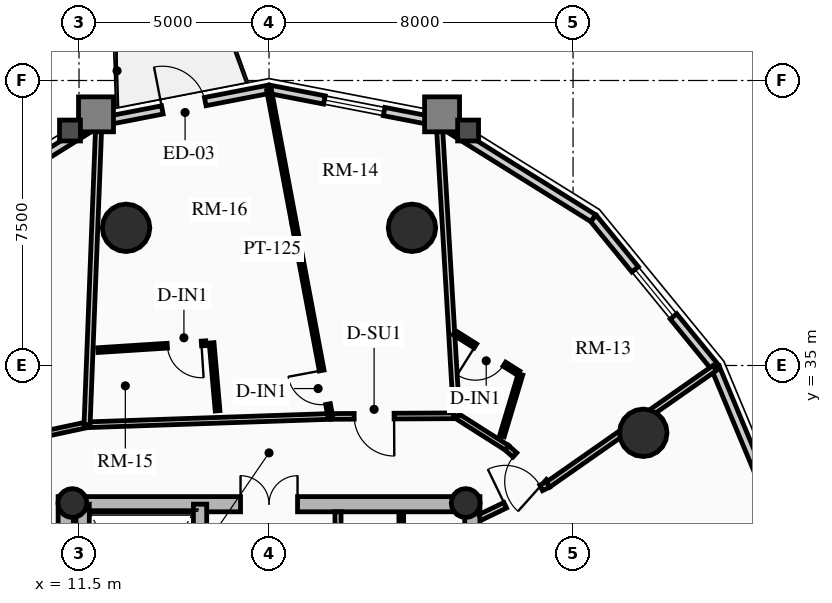
"""IFC4 building model, lengths in metres.
Left out: names, types, materials, properties, quantities, classifications, styles, units other than length and angle.
Written with IfcOpenShell. Run it as: python <this file> out.ifc"""

import sys

from ifc_helpers import new_model, si_unit, direction, frame, frame_2d, origin, origin_2d, place, context, subcontext, project, spatial, rectangle, circle, hollow_circle, extrude, source, transform, mapped, element, fill, save


model = new_model("IFC4")
c1 = context("Model", 3, precision=1e-05, world=origin(), true_north=direction((0.0, 1.0)))
c2 = subcontext(c1, "Body", "Model", "MODEL_VIEW")
j1 = project(units=[si_unit("LENGTHUNIT", "METRE"), si_unit("PLANEANGLEUNIT", "RADIAN")], contexts=[c1])
p1 = place(None, origin())
s1 = spatial("IfcSite", under=j1, at=p1, CompositionType="ELEMENT")
p2 = place(p1, origin())
s2 = spatial("IfcBuilding", under=s1, at=p2, CompositionType="ELEMENT")
p3 = place(p2, frame((0.0, 0.0, 151.6)))
s3 = spatial("IfcBuildingStorey", under=s2, at=p3, CompositionType="ELEMENT", Elevation=151.6)
for number, where, z_axis, x_axis in (
    (1, (11.15, 17.45, 0.0), (0.0, 0.0, 1.0), (0.0, 1.0, 0.0)),
    (2, (21.85, 17.45, 0.0), (0.0, 0.0, 1.0), (0.0, 1.0, 0.0)),
):
    element("IfcWall", number, at=place(p3, frame(where, z_axis=z_axis, x_axis=x_axis)), inside=s3, PredefinedType="SHEAR", context=c2, shape_type="SweptSolid", body=[
        extrude(rectangle(XDim=14.1, YDim=0.4, at=frame_2d((7.05, 0.0))), origin(), (0.0, 0.0, 1.0), 2.91),
    ])
p4 = place(p3, frame((11.15, 31.35, 0.0), z_axis=(0.0, 0.0, 1.0), x_axis=(1.0, 0.0, 0.0)))
e3 = element("IfcWall", 3, at=p4, inside=s3, PredefinedType="SHEAR", context=c2, shape_type="SweptSolid", body=[
    extrude(rectangle(XDim=10.7, YDim=0.4, at=frame_2d((5.35, 0.0))), origin(), (0.0, 0.0, 1.0), 2.91),
])
m1 = source(origin(), c2, "Body", "SweptSolid", [
    extrude(rectangle(XDim=1.5, YDim=2.02, at=frame_2d((0.75, 1.01))), frame((0.0, 0.21, 0.0), z_axis=(0.0, -1.0, 0.0), x_axis=(1.0, 0.0, 0.0)), (0.0, 0.0, 1.0), 0.42),
])
p5 = place(p4, frame((4.6, 0.0, 0.0)))
e4 = element("IfcOpeningElement", 4, at=p5, cuts=e3, PredefinedType="OPENING", context=c2, shape_type="MappedRepresentation", body=[
    mapped(m1, transform((0.0, 0.0, 0.0), x_axis=(1.0, 0.0, 0.0), y_axis=(0.0, 1.0, 0.0), z_axis=(0.0, 0.0, 1.0), scale=1.0)),
])
p6 = place(p3, frame((14.685, 17.65, 0.0), z_axis=(0.0, 0.0, 1.0), x_axis=(0.0, 1.0, 0.0)))
e5 = element("IfcWall", 5, at=p6, inside=s3, PredefinedType="SHEAR", context=c2, shape_type="SweptSolid", body=[
    extrude(rectangle(XDim=13.7, YDim=0.35, at=frame_2d((6.85, 0.0))), origin(), (0.0, 0.0, 1.0), 2.91),
])
m2 = source(origin(), c2, "Body", "SweptSolid", [
    extrude(rectangle(XDim=1.1, YDim=2.015, at=frame_2d((0.55, 1.007))), frame((0.0, 0.185, 0.0), z_axis=(0.0, -1.0, 0.0), x_axis=(1.0, 0.0, 0.0)), (0.0, 0.0, 1.0), 0.37),
])
p7 = place(p6, frame((4.85, 0.0, 0.0)))
e6 = element("IfcOpeningElement", 6, at=p7, cuts=e5, PredefinedType="OPENING", context=c2, shape_type="MappedRepresentation", body=[
    mapped(m2, transform((0.0, 0.0, 0.0), x_axis=(1.0, 0.0, 0.0), y_axis=(0.0, 1.0, 0.0), z_axis=(0.0, 0.0, 1.0), scale=1.0)),
])
p8 = place(p6, frame((0.625, 0.0, 0.0)))
e7 = element("IfcOpeningElement", 7, at=p8, cuts=e5, PredefinedType="OPENING", context=c2, shape_type="MappedRepresentation", body=[
    mapped(m2, transform((0.0, 0.0, 0.0), x_axis=(1.0, 0.0, 0.0), y_axis=(0.0, 1.0, 0.0), z_axis=(0.0, 0.0, 1.0), scale=1.0)),
])
p9 = place(p6, frame((2.625, 0.0, 0.0)))
e8 = element("IfcOpeningElement", 8, at=p9, cuts=e5, PredefinedType="OPENING", context=c2, shape_type="MappedRepresentation", body=[
    mapped(m2, transform((0.0, 0.0, 0.0), x_axis=(1.0, 0.0, 0.0), y_axis=(0.0, 1.0, 0.0), z_axis=(0.0, 0.0, 1.0), scale=1.0)),
])
m3 = source(origin(), c2, "Body", "SweptSolid", [
    extrude(rectangle(XDim=1.15, YDim=2.02, at=frame_2d((0.575, 1.01))), frame((0.0, 0.185, 0.0), z_axis=(0.0, -1.0, 0.0), x_axis=(1.0, 0.0, 0.0)), (0.0, 0.0, 1.0), 0.37),
])
p10 = place(p6, frame((7.27, 0.0, 0.0)))
e9 = element("IfcOpeningElement", 9, at=p10, cuts=e5, PredefinedType="OPENING", context=c2, shape_type="MappedRepresentation", body=[
    mapped(m3, transform((0.0, 0.0, 0.0), x_axis=(1.0, 0.0, 0.0), y_axis=(0.0, 1.0, 0.0), z_axis=(0.0, 0.0, 1.0), scale=1.0)),
])
p11 = place(p3, frame((11.595, 24.655, 0.0), z_axis=(0.0, 0.0, 1.0), x_axis=(0.0, 1.0, 0.0)))
e10 = element("IfcWall", 10, at=p11, inside=s3, PredefinedType="SHEAR", context=c2, shape_type="SweptSolid", body=[
    extrude(rectangle(XDim=6.695, YDim=0.35, at=frame_2d((3.348, 0.0))), origin(), (0.0, 0.0, 1.0), 2.91),
])
for number, where, z_axis, x_axis in (
    (11, (11.325, 31.38, 0.0), (0.0, 0.0, 1.0), (1.0, 0.0, 0.0)),
    (12, (21.675, 31.38, 0.0), (0.0, 0.0, 1.0), (1.0, 0.0, 0.0)),
):
    element("IfcColumn", number, at=place(p3, frame(where, z_axis=z_axis, x_axis=x_axis)), inside=s3, PredefinedType="COLUMN", context=c2, shape_type="SweptSolid", body=[
        extrude(hollow_circle(Radius=0.38, WallThickness=0.032, at=origin_2d()), origin(), (0.0, 0.0, 1.0), 2.91),
    ])
for number, where, z_axis, x_axis in (
    (13, (26.347, 33.229, 0.0), (0.0, 0.0, 1.0), (1.0, 0.0, 0.0)),
    (14, (20.261, 38.623, 0.0), (0.0, 0.0, 1.0), (1.0, 0.0, 0.0)),
    (15, (12.739, 38.623, 0.0), (0.0, 0.0, 1.0), (1.0, 0.0, 0.0)),
):
    element("IfcColumn", number, at=place(p3, frame(where, z_axis=z_axis, x_axis=x_axis)), inside=s3, PredefinedType="USERDEFINED", context=c2, shape_type="SweptSolid", body=[
        extrude(circle(Radius=0.625, at=origin_2d()), origin(), (0.0, 0.0, 1.0), 2.91),
    ])
p12 = place(p3, frame((28.243, 34.945, 0.0), z_axis=(0.0, 0.0, 1.0), x_axis=(0.384259959969, -0.923224936386, 0.0)))
e16 = element("IfcWall", 16, at=p12, inside=s3, PredefinedType="SOLIDWALL", context=c2, shape_type="SweptSolid", body=[
    extrude(rectangle(XDim=5.365, YDim=0.22, at=frame_2d((2.683, 0.0))), origin(), (0.0, 0.0, 1.0), 2.245),
])
p13 = place(p3, frame((25.032, 38.876, 0.0), z_axis=(0.0, 0.0, 1.0), x_axis=(0.632598524901, -0.774479894053, 0.0)))
e17 = element("IfcWall", 17, at=p13, inside=s3, PredefinedType="SOLIDWALL", context=c2, shape_type="SweptSolid", body=[
    extrude(rectangle(XDim=5.076, YDim=0.22, at=frame_2d((2.538, 0.0))), origin(), (0.0, 0.0, 1.0), 2.245),
])
m4 = source(origin(), c2, "Body", "SweptSolid", [
    extrude(rectangle(XDim=1.6, YDim=1.3, at=frame_2d((0.8, 0.65))), frame((0.0, 0.12, 0.0), z_axis=(0.0, -1.0, 0.0), x_axis=(1.0, 0.0, 0.0)), (0.0, 0.0, 1.0), 0.24),
])
p14 = place(p13, frame((1.738, 0.0, 0.65)))
e18 = element("IfcOpeningElement", 18, at=p14, cuts=e17, PredefinedType="OPENING", context=c2, shape_type="MappedRepresentation", body=[
    mapped(m4, transform((0.0, 0.0, 0.0), x_axis=(1.0, 0.0, 0.0), y_axis=(0.0, 1.0, 0.0), z_axis=(0.0, 0.0, 1.0), scale=1.0)),
])
p15 = place(p3, frame((20.985, 41.4, 0.0), z_axis=(0.0, 0.0, 1.0), x_axis=(0.848452391194, -0.529271707044, 0.0)))
e19 = element("IfcWall", 19, at=p15, inside=s3, PredefinedType="SOLIDWALL", context=c2, shape_type="SweptSolid", body=[
    extrude(rectangle(XDim=4.769, YDim=0.22, at=frame_2d((2.385, 0.0))), origin(), (0.0, 0.0, 1.0), 2.245),
])
p16 = place(p3, frame((16.5, 42.27, 0.0), z_axis=(0.0, 0.0, 1.0), x_axis=(0.981718699963, -0.190337579429, 0.0)))
e20 = element("IfcWall", 20, at=p16, inside=s3, PredefinedType="SOLIDWALL", context=c2, shape_type="SweptSolid", body=[
    extrude(rectangle(XDim=4.569, YDim=0.22, at=frame_2d((2.284, 0.0))), origin(), (0.0, 0.0, 1.0), 2.245),
])
p17 = place(p16, frame((1.484, 0.0, 0.65)))
e21 = element("IfcOpeningElement", 21, at=p17, cuts=e20, PredefinedType="OPENING", context=c2, shape_type="MappedRepresentation", body=[
    mapped(m4, transform((0.0, 0.0, 0.0), x_axis=(1.0, 0.0, 0.0), y_axis=(0.0, 1.0, 0.0), z_axis=(0.0, 0.0, 1.0), scale=1.0)),
])
p18 = place(p3, frame((12.015, 41.4, 0.0), z_axis=(0.0, 0.0, 1.0), x_axis=(0.981718699963, 0.190337579429, 0.0)))
e22 = element("IfcWall", 22, at=p18, inside=s3, PredefinedType="SOLIDWALL", context=c2, shape_type="SweptSolid", body=[
    extrude(rectangle(XDim=4.569, YDim=0.22, at=frame_2d((2.284, 0.0))), origin(), (0.0, 0.0, 1.0), 2.245),
])
m5 = source(origin(), c2, "Body", "SweptSolid", [
    extrude(rectangle(XDim=1.15, YDim=2.005, at=frame_2d((0.575, 1.002))), frame((0.0, 0.12, 0.0), z_axis=(0.0, -1.0, 0.0), x_axis=(1.0, 0.0, 0.0)), (0.0, 0.0, 1.0), 0.24),
])
p19 = place(p18, frame((1.709, 0.0, 0.0)))
e23 = element("IfcOpeningElement", 23, at=p19, cuts=e22, PredefinedType="OPENING", context=c2, shape_type="MappedRepresentation", body=[
    mapped(m5, transform((0.0, 0.0, 0.0), x_axis=(1.0, 0.0, 0.0), y_axis=(0.0, 1.0, 0.0), z_axis=(0.0, 0.0, 1.0), scale=1.0)),
])
p20 = place(p3, frame((7.968, 38.876, 0.0), z_axis=(0.0, 0.0, 1.0), x_axis=(0.848452391194, 0.529271707044, 0.0)))
e24 = element("IfcWall", 24, at=p20, inside=s3, PredefinedType="SOLIDWALL", context=c2, shape_type="SweptSolid", body=[
    extrude(rectangle(XDim=4.769, YDim=0.22, at=frame_2d((2.385, 0.0))), origin(), (0.0, 0.0, 1.0), 2.245),
])
p21 = place(p3, frame((18.315, 27.25, 0.0), z_axis=(0.0, 0.0, 1.0), x_axis=(0.0, 1.0, 0.0)))
e25 = element("IfcWall", 25, at=p21, inside=s3, PredefinedType="PARTITIONING", context=c2, shape_type="SweptSolid", body=[
    extrude(rectangle(XDim=3.9, YDim=0.16, at=frame_2d((1.95, 0.0))), origin(), (0.0, 0.0, 1.0), 2.675),
])
m6 = source(origin(), c2, "Body", "SweptSolid", [
    extrude(rectangle(XDim=0.9, YDim=2.005, at=frame_2d((0.45, 1.002))), frame((0.0, 0.09, 0.0), z_axis=(0.0, -1.0, 0.0), x_axis=(1.0, 0.0, 0.0)), (0.0, 0.0, 1.0), 0.18),
])
p22 = place(p21, frame((2.2, 0.0, 0.0)))
e26 = element("IfcOpeningElement", 26, at=p22, cuts=e25, PredefinedType="OPENING", context=c2, shape_type="MappedRepresentation", body=[
    mapped(m6, transform((0.0, 0.0, 0.0), x_axis=(1.0, 0.0, 0.0), y_axis=(0.0, 1.0, 0.0), z_axis=(0.0, 0.0, 1.0), scale=1.0)),
])
p23 = place(p3, frame((19.98, 27.3, 0.0), z_axis=(0.0, 0.0, 1.0), x_axis=(0.0, 1.0, 0.0)))
e27 = element("IfcWall", 27, at=p23, inside=s3, PredefinedType="PARTITIONING", context=c2, shape_type="SweptSolid", body=[
    extrude(rectangle(XDim=3.82, YDim=0.125, at=frame_2d((1.91, 0.0))), origin(), (0.0, 0.0, 1.0), 2.675),
])
m7 = source(origin(), c2, "Body", "SweptSolid", [
    extrude(rectangle(XDim=0.9, YDim=2.005, at=frame_2d((0.45, 1.002))), frame((0.0, 0.073, 0.0), z_axis=(0.0, -1.0, 0.0), x_axis=(1.0, 0.0, 0.0)), (0.0, 0.0, 1.0), 0.145),
])
p24 = place(p23, frame((1.45, 0.0, 0.0)))
e28 = element("IfcOpeningElement", 28, at=p24, cuts=e27, PredefinedType="OPENING", context=c2, shape_type="MappedRepresentation", body=[
    mapped(m7, transform((0.0, 0.0, 0.0), x_axis=(1.0, 0.0, 0.0), y_axis=(0.0, 1.0, 0.0), z_axis=(0.0, 0.0, 1.0), scale=1.0)),
])
p25 = place(p3, frame((23.841, 31.866, 0.0), z_axis=(0.0, 0.0, 1.0), x_axis=(-0.74511843306, 0.666932171, 0.0)))
e29 = element("IfcWall", 29, at=p25, inside=s3, PredefinedType="PARTITIONING", context=c2, shape_type="SweptSolid", body=[
    extrude(rectangle(XDim=1.455, YDim=0.15, at=frame_2d((0.728, 0.0))), origin(), (0.0, 0.0, 1.0), 2.245),
])
m8 = source(origin(), c2, "Body", "SweptSolid", [
    extrude(rectangle(XDim=1.05, YDim=2.015, at=frame_2d((0.525, 1.007))), frame((0.0, 0.085, 0.0), z_axis=(0.0, -1.0, 0.0), x_axis=(1.0, 0.0, 0.0)), (0.0, 0.0, 1.0), 0.17),
])
p26 = place(p25, frame((0.12, 0.0, 0.0)))
e30 = element("IfcOpeningElement", 30, at=p26, cuts=e29, PredefinedType="OPENING", context=c2, shape_type="MappedRepresentation", body=[
    mapped(m8, transform((0.0, 0.0, 0.0), x_axis=(1.0, 0.0, 0.0), y_axis=(0.0, 1.0, 0.0), z_axis=(0.0, 0.0, 1.0), scale=1.0)),
])
p27 = place(p3, frame((22.756, 32.836, 0.0), z_axis=(0.0, 0.0, 1.0), x_axis=(-0.843828401801, 0.536613108593, 0.0)))
e31 = element("IfcWall", 31, at=p27, inside=s3, PredefinedType="PARTITIONING", context=c2, shape_type="SweptSolid", body=[
    extrude(rectangle(XDim=1.565, YDim=0.15, at=frame_2d((0.783, 0.0))), origin(), (0.0, 0.0, 1.0), 2.245),
])
p28 = place(p3, frame((21.435, 33.677, 0.0), z_axis=(0.0, 0.0, 1.0), x_axis=(-0.999986775557, -0.005142831114, 0.0)))
e32 = element("IfcWall", 32, at=p28, inside=s3, PredefinedType="PARTITIONING", context=c2, shape_type="SweptSolid", body=[
    extrude(rectangle(XDim=3.323, YDim=0.15, at=frame_2d((1.662, 0.0))), origin(), (0.0, 0.0, 1.0), 2.245),
])
p29 = place(p28, frame((1.645, 0.0, 0.0)))
e33 = element("IfcOpeningElement", 33, at=p29, cuts=e32, PredefinedType="OPENING", context=c2, shape_type="MappedRepresentation", body=[
    mapped(m8, transform((0.0, 0.0, 0.0), x_axis=(1.0, 0.0, 0.0), y_axis=(0.0, 1.0, 0.0), z_axis=(0.0, 0.0, 1.0), scale=1.0)),
])
p30 = place(p3, frame((18.112, 33.659, 0.0), z_axis=(0.0, 0.0, 1.0), x_axis=(-0.999413895918, -0.034232508622, 0.0)))
e34 = element("IfcWall", 34, at=p30, inside=s3, PredefinedType="PARTITIONING", context=c2, shape_type="SweptSolid", body=[
    extrude(rectangle(XDim=6.404, YDim=0.15, at=frame_2d((3.202, 0.0))), origin(), (0.0, 0.0, 1.0), 2.245),
])
p31 = place(p3, frame((11.712, 33.44, 0.0), z_axis=(0.0, 0.0, 1.0), x_axis=(-0.977753514213, -0.209757158265, 0.0)))
e35 = element("IfcWall", 35, at=p31, inside=s3, PredefinedType="PARTITIONING", context=c2, shape_type="SweptSolid", body=[
    extrude(rectangle(XDim=1.901, YDim=0.15, at=frame_2d((0.95, 0.0))), origin(), (0.0, 0.0, 1.0), 2.245),
])
p32 = place(p3, frame((23.841, 31.866, 0.0), z_axis=(0.0, 0.0, 1.0), x_axis=(0.819514693563, 0.573058170724, 0.0)))
e36 = element("IfcWall", 36, at=p32, inside=s3, PredefinedType="PARTITIONING", context=c2, shape_type="SweptSolid", body=[
    extrude(rectangle(XDim=5.352, YDim=0.16, at=frame_2d((2.676, 0.0))), origin(), (0.0, 0.0, 1.0), 2.245),
])
p33 = place(p3, frame((21.435, 33.677, 0.0), z_axis=(0.0, 0.0, 1.0), x_axis=(-0.059087305226, 0.99825281886, 0.0)))
e37 = element("IfcWall", 37, at=p33, inside=s3, PredefinedType="PARTITIONING", context=c2, shape_type="SweptSolid", body=[
    extrude(rectangle(XDim=7.718, YDim=0.16, at=frame_2d((3.859, 0.0))), origin(), (0.0, 0.0, 1.0), 2.245),
])
p34 = place(p3, frame((11.712, 33.44, 0.0), z_axis=(0.0, 0.0, 1.0), x_axis=(0.038892064024, 0.999243417469, 0.0)))
e38 = element("IfcWall", 38, at=p34, inside=s3, PredefinedType="PARTITIONING", context=c2, shape_type="SweptSolid", body=[
    extrude(rectangle(XDim=7.947, YDim=0.16, at=frame_2d((3.974, 0.0))), origin(), (0.0, 0.0, 1.0), 2.245),
])
p35 = place(p3, frame((22.05, 31.0, 0.0), z_axis=(0.0, 0.0, 1.0), x_axis=(0.900241516545, 0.435390872537, 0.0)))
e39 = element("IfcWall", 39, at=p35, inside=s3, PredefinedType="PARTITIONING", context=c2, shape_type="SweptSolid", body=[
    extrude(rectangle(XDim=1.989, YDim=0.16, at=frame_2d((0.995, 0.0))), origin(), (0.0, 0.0, 1.0), 2.245),
])
m9 = source(origin(), c2, "Body", "SweptSolid", [
    extrude(rectangle(XDim=1.05, YDim=2.015, at=frame_2d((0.525, 1.007))), frame((0.0, 0.09, 0.0), z_axis=(0.0, -1.0, 0.0), x_axis=(1.0, 0.0, 0.0)), (0.0, 0.0, 1.0), 0.18),
])
p36 = place(p35, frame((0.739, 0.0, 0.0)))
e40 = element("IfcOpeningElement", 40, at=p36, cuts=e39, PredefinedType="OPENING", context=c2, shape_type="MappedRepresentation", body=[
    mapped(m9, transform((0.0, 0.0, 0.0), x_axis=(1.0, 0.0, 0.0), y_axis=(0.0, 1.0, 0.0), z_axis=(0.0, 0.0, 1.0), scale=1.0)),
])
p37 = place(p3, frame((22.628, 33.142, 0.0), z_axis=(0.0, 0.0, 1.0), x_axis=(0.28808673097, 0.957604320917, 0.0)))
e41 = element("IfcWall", 41, at=p37, inside=s3, PredefinedType="PARTITIONING", context=c2, shape_type="SweptSolid", body=[
    extrude(rectangle(XDim=1.698, YDim=0.125, at=frame_2d((0.849, 0.0))), origin(), (0.0, 0.0, 1.0), 2.245),
])
p38 = place(p3, frame((23.064, 34.801, 0.0), z_axis=(0.0, 0.0, 1.0), x_axis=(-0.846418905871, 0.532517638942, 0.0)))
e42 = element("IfcWall", 42, at=p38, inside=s3, PredefinedType="PARTITIONING", context=c2, shape_type="SweptSolid", body=[
    extrude(rectangle(XDim=1.993, YDim=0.125, at=frame_2d((0.997, 0.0))), origin(), (0.0, 0.0, 1.0), 2.675),
])
p39 = place(p38, frame((0.44, 0.0, 0.0)))
e43 = element("IfcOpeningElement", 43, at=p39, cuts=e42, PredefinedType="OPENING", context=c2, shape_type="MappedRepresentation", body=[
    mapped(m7, transform((0.0, 0.0, 0.0), x_axis=(1.0, 0.0, 0.0), y_axis=(0.0, 1.0, 0.0), z_axis=(0.0, 0.0, 1.0), scale=1.0)),
])
p40 = place(p3, frame((18.112, 33.659, 0.0), z_axis=(0.0, 0.0, 1.0), x_axis=(-0.18446223694, 0.982839601941, 0.0)))
e44 = element("IfcWall", 44, at=p40, inside=s3, PredefinedType="PARTITIONING", context=c2, shape_type="SweptSolid", body=[
    extrude(rectangle(XDim=8.74, YDim=0.125, at=frame_2d((4.37, 0.0))), origin(), (0.0, 0.0, 1.0), 2.245),
])
p41 = place(p40, frame((0.33, 0.0, 0.0)))
e45 = element("IfcOpeningElement", 45, at=p41, cuts=e44, PredefinedType="OPENING", context=c2, shape_type="MappedRepresentation", body=[
    mapped(m7, transform((0.0, 0.0, 0.0), x_axis=(1.0, 0.0, 0.0), y_axis=(0.0, 1.0, 0.0), z_axis=(0.0, 0.0, 1.0), scale=1.0)),
])
p42 = place(p3, frame((15.146, 33.807, 0.0), z_axis=(0.0, 0.0, 1.0), x_axis=(-0.087433462003, 0.996170361797, 0.0)))
e46 = element("IfcWall", 46, at=p42, inside=s3, PredefinedType="PARTITIONING", context=c2, shape_type="SweptSolid", body=[
    extrude(rectangle(XDim=1.795, YDim=0.125, at=frame_2d((0.898, 0.0))), origin(), (0.0, 0.0, 1.0), 2.675),
])
p43 = place(p3, frame((14.841, 35.586, 0.0), z_axis=(0.0, 0.0, 1.0), x_axis=(-0.997963636416, -0.063785424599, 0.0)))
e47 = element("IfcWall", 47, at=p43, inside=s3, PredefinedType="PARTITIONING", context=c2, shape_type="SweptSolid", body=[
    extrude(rectangle(XDim=2.852, YDim=0.125, at=frame_2d((1.426, 0.0))), origin(), (0.0, 0.0, 1.0), 2.245),
])
p44 = place(p43, frame((0.12, 0.0, 0.0)))
e48 = element("IfcOpeningElement", 48, at=p44, cuts=e47, PredefinedType="OPENING", context=c2, shape_type="MappedRepresentation", body=[
    mapped(m7, transform((0.0, 0.0, 0.0), x_axis=(1.0, 0.0, 0.0), y_axis=(0.0, 1.0, 0.0), z_axis=(0.0, 0.0, 1.0), scale=1.0)),
])
m10 = source(origin(), c2, "Body", "SweptSolid", [
    extrude(rectangle(XDim=1.6, YDim=1.3, at=frame_2d((0.8, 0.65))), frame((0.0, 0.03, 0.0), z_axis=(0.0, -1.0, 0.0), x_axis=(1.0, 0.0, 0.0)), (0.0, 0.0, 1.0), 0.06),
])
p45 = place(p14, origin())
e49 = element("IfcWindow", 49, at=p45, inside=s3, PartitioningType="SINGLE_PANEL", PredefinedType="WINDOW", context=c2, shape_type="MappedRepresentation", body=[
    mapped(m10, transform((0.0, 0.0, 0.0), x_axis=(1.0, 0.0, 0.0), y_axis=(0.0, 1.0, 0.0), z_axis=(0.0, 0.0, 1.0), scale=1.0)),
])
fill(e18, e49)
p46 = place(p17, origin())
e50 = element("IfcWindow", 50, at=p46, inside=s3, PartitioningType="SINGLE_PANEL", PredefinedType="WINDOW", context=c2, shape_type="MappedRepresentation", body=[
    mapped(m10, transform((0.0, 0.0, 0.0), x_axis=(1.0, 0.0, 0.0), y_axis=(0.0, 1.0, 0.0), z_axis=(0.0, 0.0, 1.0), scale=1.0)),
])
fill(e21, e50)
m11 = source(origin(), c2, "Body", "SweptSolid", [
    extrude(rectangle(XDim=1.15, YDim=2.005, at=frame_2d((0.575, 1.002))), frame((0.0, 0.025, 0.0), z_axis=(0.0, -1.0, 0.0), x_axis=(1.0, 0.0, 0.0)), (0.0, 0.0, 1.0), 0.05),
])
p47 = place(p19, origin())
e51 = element("IfcDoor", 51, at=p47, inside=s3, OperationType="SINGLE_SWING_LEFT", PredefinedType="DOOR", context=c2, shape_type="MappedRepresentation", body=[
    mapped(m11, transform((0.0, 0.0, 0.0), x_axis=(1.0, 0.0, 0.0), y_axis=(0.0, 1.0, 0.0), z_axis=(0.0, 0.0, 1.0), scale=1.0)),
])
fill(e23, e51)
m12 = source(origin(), c2, "Body", "SweptSolid", [
    extrude(rectangle(XDim=1.5, YDim=2.02, at=frame_2d((0.75, 1.01))), frame((0.0, 0.025, 0.0), z_axis=(0.0, -1.0, 0.0), x_axis=(1.0, 0.0, 0.0)), (0.0, 0.0, 1.0), 0.05),
])
p48 = place(p5, origin())
e52 = element("IfcDoor", 52, at=p48, inside=s3, OperationType="DOUBLE_DOOR_SINGLE_SWING", PredefinedType="DOOR", context=c2, shape_type="MappedRepresentation", body=[
    mapped(m12, transform((0.0, 0.0, 0.0), x_axis=(1.0, 0.0, 0.0), y_axis=(0.0, 1.0, 0.0), z_axis=(0.0, 0.0, 1.0), scale=1.0)),
])
fill(e4, e52)
m13 = source(origin(), c2, "Body", "SweptSolid", [
    extrude(rectangle(XDim=1.05, YDim=2.015, at=frame_2d((0.525, 1.007))), frame((0.0, 0.025, 0.0), z_axis=(0.0, -1.0, 0.0), x_axis=(1.0, 0.0, 0.0)), (0.0, 0.0, 1.0), 0.05),
])
p49 = place(p36, origin())
e53 = element("IfcDoor", 53, at=p49, inside=s3, OperationType="SINGLE_SWING_LEFT", PredefinedType="DOOR", context=c2, shape_type="MappedRepresentation", body=[
    mapped(m13, transform((0.0, 0.0, 0.0), x_axis=(1.0, 0.0, 0.0), y_axis=(0.0, 1.0, 0.0), z_axis=(0.0, 0.0, 1.0), scale=1.0)),
])
fill(e40, e53)
p50 = place(p26, origin())
e54 = element("IfcDoor", 54, at=p50, inside=s3, OperationType="SINGLE_SWING_LEFT", PredefinedType="DOOR", context=c2, shape_type="MappedRepresentation", body=[
    mapped(m13, transform((0.0, 0.0, 0.0), x_axis=(1.0, 0.0, 0.0), y_axis=(0.0, 1.0, 0.0), z_axis=(0.0, 0.0, 1.0), scale=1.0)),
])
fill(e30, e54)
m14 = source(origin(), c2, "Body", "SweptSolid", [
    extrude(rectangle(XDim=0.9, YDim=2.005, at=frame_2d((0.45, 1.002))), frame((0.0, 0.025, 0.0), z_axis=(0.0, -1.0, 0.0), x_axis=(1.0, 0.0, 0.0)), (0.0, 0.0, 1.0), 0.05),
])
p51 = place(p39, origin())
e55 = element("IfcDoor", 55, at=p51, inside=s3, OperationType="SINGLE_SWING_RIGHT", PredefinedType="DOOR", context=c2, shape_type="MappedRepresentation", body=[
    mapped(m14, transform((0.0, 0.0, 0.0), x_axis=(1.0, 0.0, 0.0), y_axis=(0.0, 1.0, 0.0), z_axis=(0.0, 0.0, 1.0), scale=1.0)),
])
fill(e43, e55)
p52 = place(p29, origin())
e56 = element("IfcDoor", 56, at=p52, inside=s3, OperationType="SINGLE_SWING_LEFT", PredefinedType="DOOR", context=c2, shape_type="MappedRepresentation", body=[
    mapped(m13, transform((0.0, 0.0, 0.0), x_axis=(1.0, 0.0, 0.0), y_axis=(0.0, 1.0, 0.0), z_axis=(0.0, 0.0, 1.0), scale=1.0)),
])
fill(e33, e56)
p53 = place(p41, origin())
e57 = element("IfcDoor", 57, at=p53, inside=s3, OperationType="SINGLE_SWING_RIGHT", PredefinedType="DOOR", context=c2, shape_type="MappedRepresentation", body=[
    mapped(m14, transform((0.0, 0.0, 0.0), x_axis=(1.0, 0.0, 0.0), y_axis=(0.0, 1.0, 0.0), z_axis=(0.0, 0.0, 1.0), scale=1.0)),
])
fill(e45, e57)
p54 = place(p44, origin())
e58 = element("IfcDoor", 58, at=p54, inside=s3, OperationType="SINGLE_SWING_LEFT", PredefinedType="DOOR", context=c2, shape_type="MappedRepresentation", body=[
    mapped(m14, transform((0.0, 0.0, 0.0), x_axis=(1.0, 0.0, 0.0), y_axis=(0.0, 1.0, 0.0), z_axis=(0.0, 0.0, 1.0), scale=1.0)),
])
fill(e48, e58)
save(model, sys.argv[1])
